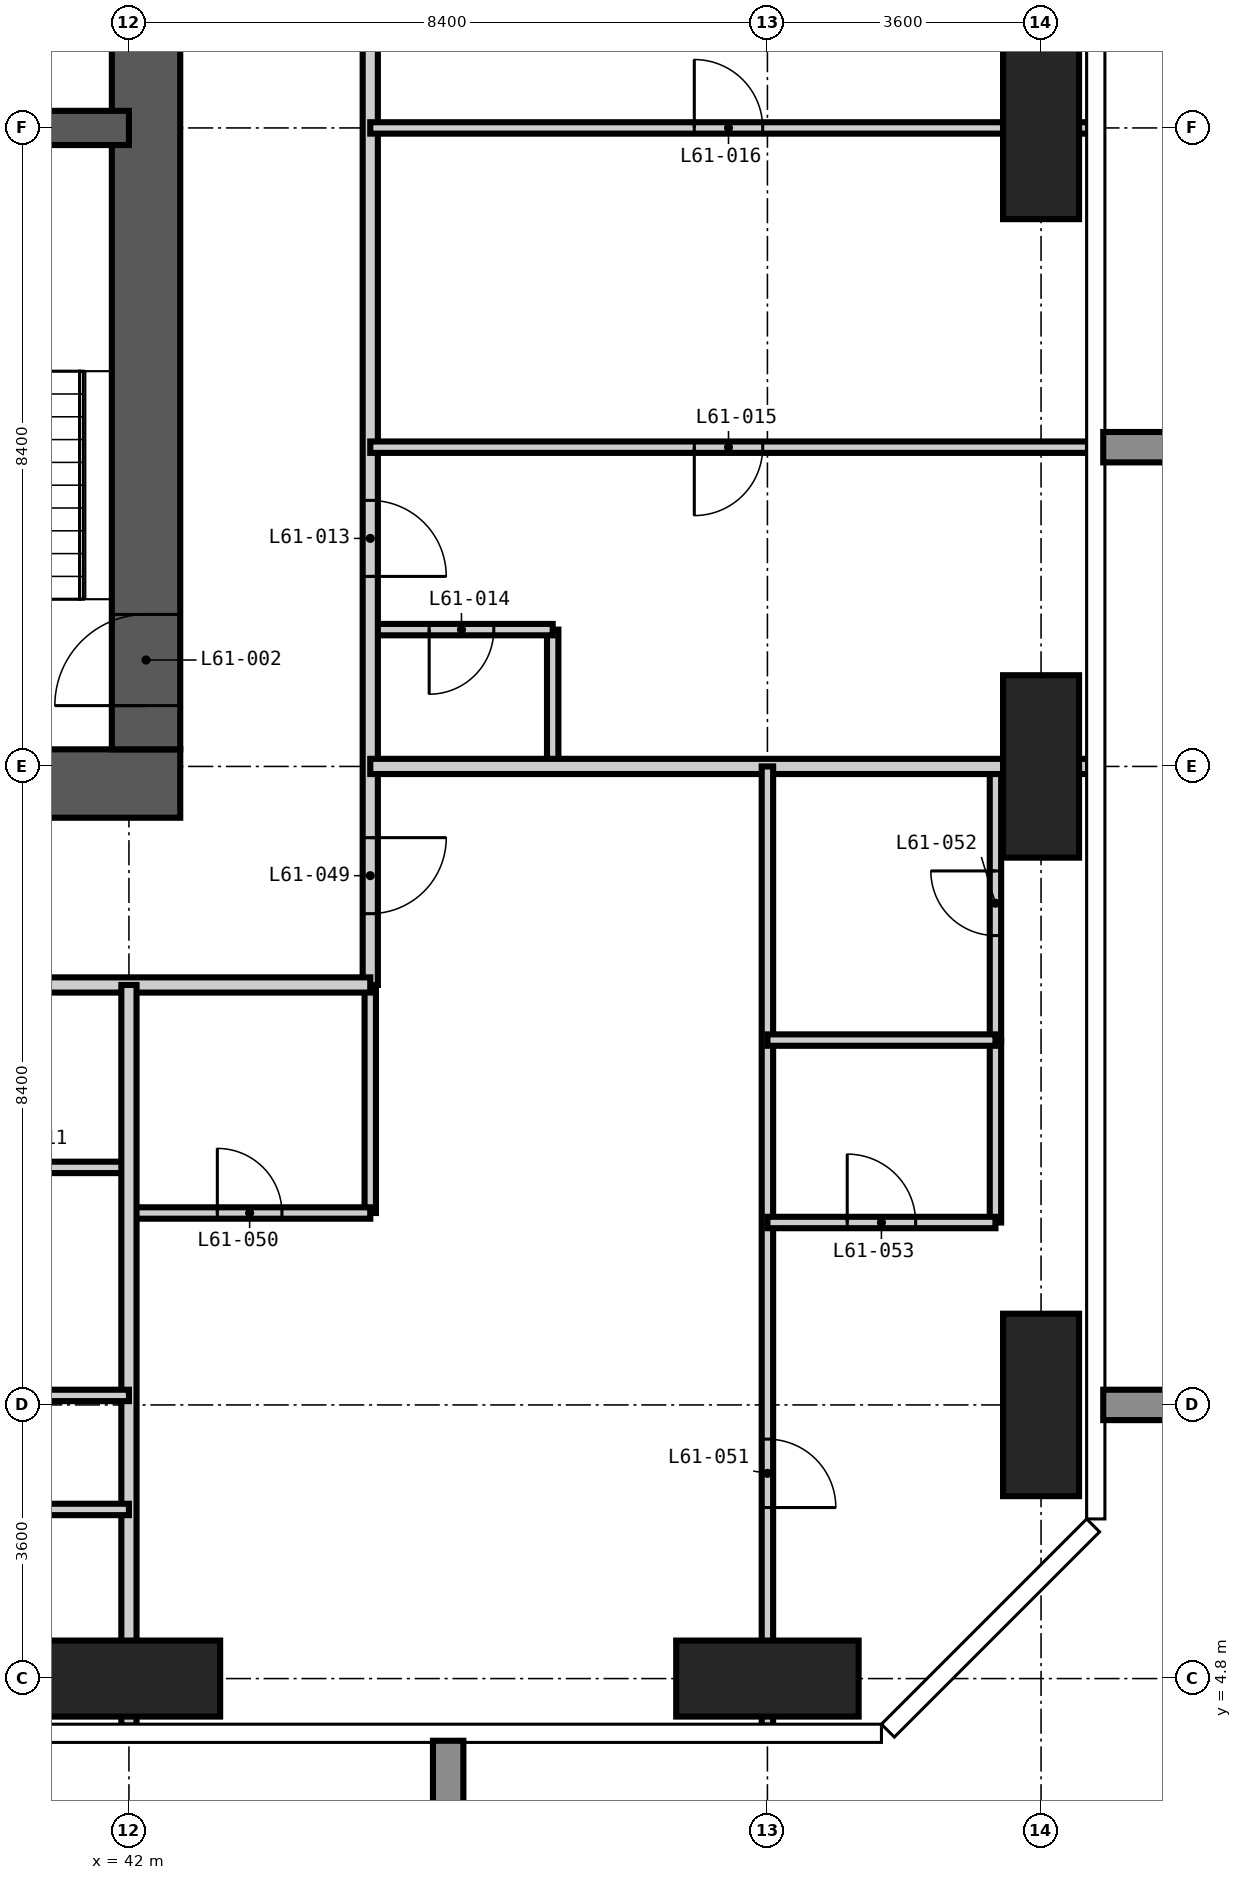
"""IFC4 building model, lengths in metres.
Left out: names, types, materials, properties, quantities, classifications, styles, units other than length and angle.
Written with IfcOpenShell. Run it as: python <this file> out.ifc"""

import sys

from ifc_helpers import new_model, si_unit, direction, frame, frame_2d, origin, origin_2d, place, context, subcontext, project, spatial, rectangle, extrude, element, fill, save


model = new_model("IFC4")
c1 = context("Model", 3, precision=1e-05, world=origin(), true_north=direction((0.0, 1.0)))
c2 = subcontext(c1, "Body", "Model", "MODEL_VIEW")
j1 = project(units=[si_unit("LENGTHUNIT", "METRE"), si_unit("PLANEANGLEUNIT", "RADIAN")], contexts=[c1])
p1 = place(None, origin())
s1 = spatial("IfcSite", under=j1, at=p1, CompositionType="ELEMENT")
p2 = place(p1, origin())
s2 = spatial("IfcBuilding", under=s1, at=p2, CompositionType="ELEMENT")
p3 = place(p2, frame((0.0, 0.0, 237.3)))
s3 = spatial("IfcBuildingStorey", under=s2, at=p3, CompositionType="ELEMENT", Elevation=237.3)
for number, where, z_axis, x_axis in (
    (1, (42.0, 4.8, -0.35), (0.0, 0.0, 1.0), (1.0, 0.0, 0.0)),
    (2, (50.4, 4.8, -0.35), (0.0, 0.0, 1.0), (1.0, 0.0, 0.0)),
):
    element("IfcColumn", number, at=place(p3, frame(where, z_axis=z_axis, x_axis=x_axis)), inside=s3, PredefinedType="COLUMN", context=c2, shape_type="SweptSolid", body=[
        extrude(rectangle(XDim=2.4, YDim=1.0, at=origin_2d()), origin(), (0.0, 0.0, 1.0), 3.9),
    ])
for number, where, z_axis, x_axis in (
    (3, (54.0, 8.4, -0.35), (0.0, 0.0, 1.0), (1.0, 0.0, 0.0)),
    (4, (54.0, 16.8, -0.35), (0.0, 0.0, 1.0), (1.0, 0.0, 0.0)),
    (5, (54.0, 25.2, -0.35), (0.0, 0.0, 1.0), (1.0, 0.0, 0.0)),
):
    element("IfcColumn", number, at=place(p3, frame(where, z_axis=z_axis, x_axis=x_axis)), inside=s3, PredefinedType="COLUMN", context=c2, shape_type="SweptSolid", body=[
        extrude(rectangle(XDim=1.0, YDim=2.4, at=origin_2d()), origin(), (0.0, 0.0, 1.0), 3.9),
    ])
p4 = place(p3, frame((24.525, 16.575, -0.35), z_axis=(0.0, 0.0, 1.0), x_axis=(1.0, 0.0, 0.0)))
e6 = element("IfcWall", 6, at=p4, inside=s3, PredefinedType="SHEAR", context=c2, shape_type="SweptSolid", body=[
    extrude(rectangle(XDim=18.15, YDim=0.9, at=frame_2d((9.075, 0.0))), origin(), (0.0, 0.0, 1.0), 3.9),
])
p5 = place(p4, frame((4.375, 0.0, 0.35)))
e7 = element("IfcOpeningElement", 7, at=p5, cuts=e6, PredefinedType="OPENING", context=c2, shape_type="SweptSolid", body=[
    extrude(rectangle(XDim=1.0, YDim=2.1, at=frame_2d((0.5, 1.05))), frame((0.0, 0.46, 0.0), z_axis=(0.0, -1.0, 0.0), x_axis=(1.0, 0.0, 0.0)), (0.0, 0.0, 1.0), 0.92),
])
p6 = place(p4, frame((10.675, 0.0, 0.35)))
e8 = element("IfcOpeningElement", 8, at=p6, cuts=e6, PredefinedType="OPENING", context=c2, shape_type="SweptSolid", body=[
    extrude(rectangle(XDim=1.0, YDim=2.1, at=frame_2d((0.5, 1.05))), frame((0.0, 0.46, 0.0), z_axis=(0.0, -1.0, 0.0), x_axis=(1.0, 0.0, 0.0)), (0.0, 0.0, 1.0), 0.92),
])
p7 = place(p3, frame((42.225, 17.025, -0.35), z_axis=(0.0, 0.0, 1.0), x_axis=(0.0, 1.0, 0.0)))
e9 = element("IfcWall", 9, at=p7, inside=s3, PredefinedType="SHEAR", context=c2, shape_type="SweptSolid", body=[
    extrude(rectangle(XDim=24.75, YDim=0.9, at=frame_2d((12.375, 0.0))), origin(), (0.0, 0.0, 1.0), 3.9),
])
p8 = place(p7, frame((0.575, 0.0, 0.35)))
e10 = element("IfcOpeningElement", 10, at=p8, cuts=e9, PredefinedType="OPENING", context=c2, shape_type="SweptSolid", body=[
    extrude(rectangle(XDim=1.2, YDim=2.2, at=frame_2d((0.6, 1.1))), frame((0.0, 0.46, 0.0), z_axis=(0.0, -1.0, 0.0), x_axis=(1.0, 0.0, 0.0)), (0.0, 0.0, 1.0), 0.92),
])
p9 = place(p7, frame((11.475, 0.0, 0.35)))
e11 = element("IfcOpeningElement", 11, at=p9, cuts=e9, PredefinedType="OPENING", context=c2, shape_type="SweptSolid", body=[
    extrude(rectangle(XDim=1.8, YDim=2.2, at=frame_2d((0.9, 1.1))), frame((0.0, 0.46, 0.0), z_axis=(0.0, -1.0, 0.0), x_axis=(1.0, 0.0, 0.0)), (0.0, 0.0, 1.0), 0.92),
])
p10 = place(p7, frame((20.275, 0.0, 0.35)))
e12 = element("IfcOpeningElement", 12, at=p10, cuts=e9, PredefinedType="OPENING", context=c2, shape_type="SweptSolid", body=[
    extrude(rectangle(XDim=1.0, YDim=2.1, at=frame_2d((0.5, 1.05))), frame((0.0, 0.46, 0.0), z_axis=(0.0, -1.0, 0.0), x_axis=(1.0, 0.0, 0.0)), (0.0, 0.0, 1.0), 0.92),
])
p11 = place(p3, frame((25.2, 25.2, -0.35), z_axis=(0.0, 0.0, 1.0), x_axis=(1.0, 0.0, 0.0)))
e13 = element("IfcWall", 13, at=p11, inside=s3, PredefinedType="SHEAR", context=c2, shape_type="SweptSolid", body=[
    extrude(rectangle(XDim=16.8, YDim=0.45, at=frame_2d((8.4, 0.0))), origin(), (0.0, 0.0, 1.0), 3.9),
])
p12 = place(p3, frame((45.175, 10.925, 0.0), z_axis=(0.0, 0.0, 1.0), x_axis=(0.0, 1.0, 0.0)))
e14 = element("IfcWall", 14, at=p12, inside=s3, PredefinedType="PARTITIONING", context=c2, shape_type="SweptSolid", body=[
    extrude(rectangle(XDim=3.0, YDim=0.15, at=frame_2d((1.5, 0.0))), origin(), (0.0, 0.0, 1.0), 3.55),
])
p13 = place(p3, frame((47.575, 16.8, 0.0), z_axis=(0.0, 0.0, 1.0), x_axis=(0.0, 1.0, 0.0)))
e15 = element("IfcWall", 15, at=p13, inside=s3, PredefinedType="PARTITIONING", context=c2, shape_type="SweptSolid", body=[
    extrude(rectangle(XDim=1.8, YDim=0.15, at=frame_2d((0.9, 0.0))), origin(), (0.0, 0.0, 1.0), 3.55),
])
p14 = place(p3, frame((53.4, 13.2, 0.0), z_axis=(0.0, 0.0, 1.0), x_axis=(0.0, 1.0, 0.0)))
e16 = element("IfcWall", 16, at=p14, inside=s3, PredefinedType="PARTITIONING", context=c2, shape_type="SweptSolid", body=[
    extrude(rectangle(XDim=3.6, YDim=0.15, at=frame_2d((1.8, 0.0))), origin(), (0.0, 0.0, 1.0), 3.55),
])
p15 = place(p14, frame((1.375, 0.0, 0.0)))
e17 = element("IfcOpeningElement", 17, at=p15, cuts=e16, PredefinedType="OPENING", context=c2, shape_type="SweptSolid", body=[
    extrude(rectangle(XDim=0.85, YDim=2.1, at=frame_2d((0.425, 1.05))), frame((0.0, 0.085, 0.0), z_axis=(0.0, -1.0, 0.0), x_axis=(1.0, 0.0, 0.0)), (0.0, 0.0, 1.0), 0.17),
])
p16 = place(p3, frame((42.0, 10.925, 0.0), z_axis=(0.0, 0.0, 1.0), x_axis=(1.0, 0.0, 0.0)))
e18 = element("IfcWall", 18, at=p16, inside=s3, PredefinedType="PARTITIONING", context=c2, shape_type="SweptSolid", body=[
    extrude(rectangle(XDim=3.175, YDim=0.15, at=frame_2d((1.587, 0.0))), origin(), (0.0, 0.0, 1.0), 3.55),
])
p17 = place(p16, frame((1.163, 0.0, 0.0)))
e19 = element("IfcOpeningElement", 19, at=p17, cuts=e18, PredefinedType="OPENING", context=c2, shape_type="SweptSolid", body=[
    extrude(rectangle(XDim=0.85, YDim=2.1, at=frame_2d((0.425, 1.05))), frame((0.0, 0.085, 0.0), z_axis=(0.0, -1.0, 0.0), x_axis=(1.0, 0.0, 0.0)), (0.0, 0.0, 1.0), 0.17),
])
p18 = place(p3, frame((39.0, 11.525, 0.0), z_axis=(0.0, 0.0, 1.0), x_axis=(1.0, 0.0, 0.0)))
e20 = element("IfcWall", 20, at=p18, inside=s3, PredefinedType="PARTITIONING", context=c2, shape_type="SweptSolid", body=[
    extrude(rectangle(XDim=3.0, YDim=0.15, at=frame_2d((1.5, 0.0))), origin(), (0.0, 0.0, 1.0), 3.55),
])
p19 = place(p18, frame((1.075, 0.0, 0.0)))
e21 = element("IfcOpeningElement", 21, at=p19, cuts=e20, PredefinedType="OPENING", context=c2, shape_type="SweptSolid", body=[
    extrude(rectangle(XDim=0.85, YDim=2.1, at=frame_2d((0.425, 1.05))), frame((0.0, 0.085, 0.0), z_axis=(0.0, -1.0, 0.0), x_axis=(1.0, 0.0, 0.0)), (0.0, 0.0, 1.0), 0.17),
])
p20 = place(p3, frame((45.175, 18.6, 0.0), z_axis=(0.0, 0.0, 1.0), x_axis=(1.0, 0.0, 0.0)))
e22 = element("IfcWall", 22, at=p20, inside=s3, PredefinedType="PARTITIONING", context=c2, shape_type="SweptSolid", body=[
    extrude(rectangle(XDim=2.4, YDim=0.15, at=frame_2d((1.2, 0.0))), origin(), (0.0, 0.0, 1.0), 3.55),
])
p21 = place(p20, frame((0.775, 0.0, 0.0)))
e23 = element("IfcOpeningElement", 23, at=p21, cuts=e22, PredefinedType="OPENING", context=c2, shape_type="SweptSolid", body=[
    extrude(rectangle(XDim=0.85, YDim=2.1, at=frame_2d((0.425, 1.05))), frame((0.0, 0.085, 0.0), z_axis=(0.0, -1.0, 0.0), x_axis=(1.0, 0.0, 0.0)), (0.0, 0.0, 1.0), 0.17),
])
p22 = place(p3, frame((45.175, 29.4, 0.0), z_axis=(0.0, 0.0, 1.0), x_axis=(0.0, -1.0, 0.0)))
e24 = element("IfcWall", 24, at=p22, inside=s3, PredefinedType="PARTITIONING", context=c2, shape_type="SweptSolid", body=[
    extrude(rectangle(XDim=15.475, YDim=0.2, at=frame_2d((7.737, 0.0))), origin(), (0.0, 0.0, 1.0), 3.55),
])
p23 = place(p22, frame((9.1, 0.0, 0.0)))
e25 = element("IfcOpeningElement", 25, at=p23, cuts=e24, PredefinedType="OPENING", context=c2, shape_type="SweptSolid", body=[
    extrude(rectangle(XDim=1.0, YDim=2.2, at=frame_2d((0.5, 1.1))), frame((0.0, 0.11, 0.0), z_axis=(0.0, -1.0, 0.0), x_axis=(1.0, 0.0, 0.0)), (0.0, 0.0, 1.0), 0.22),
])
p24 = place(p22, frame((13.537, 0.0, 0.0)))
e26 = element("IfcOpeningElement", 26, at=p24, cuts=e24, PredefinedType="OPENING", context=c2, shape_type="SweptSolid", body=[
    extrude(rectangle(XDim=1.0, YDim=2.2, at=frame_2d((0.5, 1.1))), frame((0.0, 0.11, 0.0), z_axis=(0.0, -1.0, 0.0), x_axis=(1.0, 0.0, 0.0)), (0.0, 0.0, 1.0), 0.22),
])
p25 = place(p3, frame((45.175, 13.925, 0.0), z_axis=(0.0, 0.0, 1.0), x_axis=(-1.0, 0.0, 0.0)))
e27 = element("IfcWall", 27, at=p25, inside=s3, PredefinedType="PARTITIONING", context=c2, shape_type="SweptSolid", body=[
    extrude(rectangle(XDim=22.85, YDim=0.2, at=frame_2d((11.425, 0.0))), origin(), (0.0, 0.0, 1.0), 3.55),
])
p26 = place(p25, frame((15.275, 0.0, 0.0)))
e28 = element("IfcOpeningElement", 28, at=p26, cuts=e27, PredefinedType="OPENING", context=c2, shape_type="SweptSolid", body=[
    extrude(rectangle(XDim=1.0, YDim=2.2, at=frame_2d((0.5, 1.1))), frame((0.0, 0.11, 0.0), z_axis=(0.0, -1.0, 0.0), x_axis=(1.0, 0.0, 0.0)), (0.0, 0.0, 1.0), 0.22),
])
p27 = place(p25, frame((6.875, 0.0, 0.0)))
e29 = element("IfcOpeningElement", 29, at=p27, cuts=e27, PredefinedType="OPENING", context=c2, shape_type="SweptSolid", body=[
    extrude(rectangle(XDim=1.0, YDim=2.2, at=frame_2d((0.5, 1.1))), frame((0.0, 0.11, 0.0), z_axis=(0.0, -1.0, 0.0), x_axis=(1.0, 0.0, 0.0)), (0.0, 0.0, 1.0), 0.22),
])
p28 = place(p3, frame((42.0, 4.182, 0.0), z_axis=(0.0, 0.0, 1.0), x_axis=(0.0, 1.0, 0.0)))
e30 = element("IfcWall", 30, at=p28, inside=s3, PredefinedType="PARTITIONING", context=c2, shape_type="SweptSolid", body=[
    extrude(rectangle(XDim=9.743, YDim=0.2, at=frame_2d((4.872, 0.0))), origin(), (0.0, 0.0, 1.0), 3.55),
])
p29 = place(p3, frame((45.175, 16.8, 0.0), z_axis=(0.0, 0.0, 1.0), x_axis=(1.0, 0.0, 0.0)))
e31 = element("IfcWall", 31, at=p29, inside=s3, PredefinedType="PARTITIONING", context=c2, shape_type="SweptSolid", body=[
    extrude(rectangle(XDim=9.443, YDim=0.2, at=frame_2d((4.721, 0.0))), origin(), (0.0, 0.0, 1.0), 3.55),
])
p30 = place(p3, frame((50.4, 4.182, 0.0), z_axis=(0.0, 0.0, 1.0), x_axis=(0.0, 1.0, 0.0)))
e32 = element("IfcWall", 32, at=p30, inside=s3, PredefinedType="PARTITIONING", context=c2, shape_type="SweptSolid", body=[
    extrude(rectangle(XDim=12.618, YDim=0.15, at=frame_2d((6.309, 0.0))), origin(), (0.0, 0.0, 1.0), 3.55),
])
p31 = place(p30, frame((2.868, 0.0, 0.0)))
e33 = element("IfcOpeningElement", 33, at=p31, cuts=e32, PredefinedType="OPENING", context=c2, shape_type="SweptSolid", body=[
    extrude(rectangle(XDim=0.9, YDim=2.1, at=frame_2d((0.45, 1.05))), frame((0.0, 0.085, 0.0), z_axis=(0.0, -1.0, 0.0), x_axis=(1.0, 0.0, 0.0)), (0.0, 0.0, 1.0), 0.17),
])
p32 = place(p3, frame((53.4, 10.8, 0.0), z_axis=(0.0, 0.0, 1.0), x_axis=(0.0, 1.0, 0.0)))
e34 = element("IfcWall", 34, at=p32, inside=s3, PredefinedType="PARTITIONING", context=c2, shape_type="SweptSolid", body=[
    extrude(rectangle(XDim=2.4, YDim=0.15, at=frame_2d((1.2, 0.0))), origin(), (0.0, 0.0, 1.0), 3.55),
])
p33 = place(p3, frame((39.0, 7.025, 0.0), z_axis=(0.0, 0.0, 1.0), x_axis=(1.0, 0.0, 0.0)))
e35 = element("IfcWall", 35, at=p33, inside=s3, PredefinedType="PARTITIONING", context=c2, shape_type="SweptSolid", body=[
    extrude(rectangle(XDim=3.0, YDim=0.15, at=frame_2d((1.5, 0.0))), origin(), (0.0, 0.0, 1.0), 3.55),
])
p34 = place(p33, frame((1.05, 0.0, 0.0)))
e36 = element("IfcOpeningElement", 36, at=p34, cuts=e35, PredefinedType="OPENING", context=c2, shape_type="SweptSolid", body=[
    extrude(rectangle(XDim=0.9, YDim=2.1, at=frame_2d((0.45, 1.05))), frame((0.0, 0.085, 0.0), z_axis=(0.0, -1.0, 0.0), x_axis=(1.0, 0.0, 0.0)), (0.0, 0.0, 1.0), 0.17),
])
p35 = place(p3, frame((39.0, 8.525, 0.0), z_axis=(0.0, 0.0, 1.0), x_axis=(1.0, 0.0, 0.0)))
e37 = element("IfcWall", 37, at=p35, inside=s3, PredefinedType="PARTITIONING", context=c2, shape_type="SweptSolid", body=[
    extrude(rectangle(XDim=3.0, YDim=0.15, at=frame_2d((1.5, 0.0))), origin(), (0.0, 0.0, 1.0), 3.55),
])
p36 = place(p3, frame((50.4, 10.8, 0.0), z_axis=(0.0, 0.0, 1.0), x_axis=(1.0, 0.0, 0.0)))
e38 = element("IfcWall", 38, at=p36, inside=s3, PredefinedType="PARTITIONING", context=c2, shape_type="SweptSolid", body=[
    extrude(rectangle(XDim=3.0, YDim=0.15, at=frame_2d((1.5, 0.0))), origin(), (0.0, 0.0, 1.0), 3.55),
])
p37 = place(p36, frame((1.05, 0.0, 0.0)))
e39 = element("IfcOpeningElement", 39, at=p37, cuts=e38, PredefinedType="OPENING", context=c2, shape_type="SweptSolid", body=[
    extrude(rectangle(XDim=0.9, YDim=2.1, at=frame_2d((0.45, 1.05))), frame((0.0, 0.085, 0.0), z_axis=(0.0, -1.0, 0.0), x_axis=(1.0, 0.0, 0.0)), (0.0, 0.0, 1.0), 0.17),
])
p38 = place(p3, frame((50.4, 13.2, 0.0), z_axis=(0.0, 0.0, 1.0), x_axis=(1.0, 0.0, 0.0)))
e40 = element("IfcWall", 40, at=p38, inside=s3, PredefinedType="PARTITIONING", context=c2, shape_type="SweptSolid", body=[
    extrude(rectangle(XDim=3.0, YDim=0.15, at=frame_2d((1.5, 0.0))), origin(), (0.0, 0.0, 1.0), 3.55),
])
p39 = place(p3, frame((45.175, 21.0, 0.0), z_axis=(0.0, 0.0, 1.0), x_axis=(1.0, 0.0, 0.0)))
e41 = element("IfcWall", 41, at=p39, inside=s3, PredefinedType="PARTITIONING", context=c2, shape_type="SweptSolid", body=[
    extrude(rectangle(XDim=9.443, YDim=0.15, at=frame_2d((4.721, 0.0))), origin(), (0.0, 0.0, 1.0), 3.55),
])
p40 = place(p39, frame((4.263, 0.0, 0.0)))
e42 = element("IfcOpeningElement", 42, at=p40, cuts=e41, PredefinedType="OPENING", context=c2, shape_type="SweptSolid", body=[
    extrude(rectangle(XDim=0.9, YDim=2.1, at=frame_2d((0.45, 1.05))), frame((0.0, 0.085, 0.0), z_axis=(0.0, -1.0, 0.0), x_axis=(1.0, 0.0, 0.0)), (0.0, 0.0, 1.0), 0.17),
])
p41 = place(p3, frame((45.175, 25.2, 0.0), z_axis=(0.0, 0.0, 1.0), x_axis=(1.0, 0.0, 0.0)))
e43 = element("IfcWall", 43, at=p41, inside=s3, PredefinedType="PARTITIONING", context=c2, shape_type="SweptSolid", body=[
    extrude(rectangle(XDim=9.443, YDim=0.15, at=frame_2d((4.721, 0.0))), origin(), (0.0, 0.0, 1.0), 3.55),
])
p42 = place(p41, frame((4.263, 0.0, 0.0)))
e44 = element("IfcOpeningElement", 44, at=p42, cuts=e43, PredefinedType="OPENING", context=c2, shape_type="SweptSolid", body=[
    extrude(rectangle(XDim=0.9, YDim=2.1, at=frame_2d((0.45, 1.05))), frame((0.0, 0.085, 0.0), z_axis=(0.0, -1.0, 0.0), x_axis=(1.0, 0.0, 0.0)), (0.0, 0.0, 1.0), 0.17),
])
p43 = place(p8, origin())
e45 = element("IfcDoor", 45, at=p43, inside=s3, OperationType="SINGLE_SWING_LEFT", PredefinedType="DOOR", context=c2, shape_type="SweptSolid", body=[
    extrude(rectangle(XDim=1.2, YDim=2.2, at=frame_2d((0.6, 1.1))), frame((0.0, 0.025, 0.0), z_axis=(0.0, -1.0, 0.0), x_axis=(1.0, 0.0, 0.0)), (0.0, 0.0, 1.0), 0.05),
])
fill(e10, e45)
p44 = place(p23, origin())
e46 = element("IfcDoor", 46, at=p44, inside=s3, OperationType="SINGLE_SWING_RIGHT", PredefinedType="DOOR", context=c2, shape_type="SweptSolid", body=[
    extrude(rectangle(XDim=1.0, YDim=2.2, at=frame_2d((0.5, 1.1))), frame((0.0, 0.025, 0.0), z_axis=(0.0, -1.0, 0.0), x_axis=(1.0, 0.0, 0.0)), (0.0, 0.0, 1.0), 0.05),
])
fill(e25, e46)
p45 = place(p21, frame((0.85, 0.0, 0.0), z_axis=(0.0, 0.0, 1.0), x_axis=(-1.0, 0.0, 0.0)))
e47 = element("IfcDoor", 47, at=p45, inside=s3, OperationType="SINGLE_SWING_RIGHT", PredefinedType="DOOR", context=c2, shape_type="SweptSolid", body=[
    extrude(rectangle(XDim=0.85, YDim=2.1, at=frame_2d((0.425, 1.05))), frame((0.0, 0.025, 0.0), z_axis=(0.0, -1.0, 0.0), x_axis=(1.0, 0.0, 0.0)), (0.0, 0.0, 1.0), 0.05),
])
fill(e23, e47)
p46 = place(p40, frame((0.9, 0.0, 0.0), z_axis=(0.0, 0.0, 1.0), x_axis=(-1.0, 0.0, 0.0)))
e48 = element("IfcDoor", 48, at=p46, inside=s3, OperationType="SINGLE_SWING_RIGHT", PredefinedType="DOOR", context=c2, shape_type="SweptSolid", body=[
    extrude(rectangle(XDim=0.9, YDim=2.1, at=frame_2d((0.45, 1.05))), frame((0.0, 0.025, 0.0), z_axis=(0.0, -1.0, 0.0), x_axis=(1.0, 0.0, 0.0)), (0.0, 0.0, 1.0), 0.05),
])
fill(e42, e48)
p47 = place(p42, origin())
e49 = element("IfcDoor", 49, at=p47, inside=s3, OperationType="SINGLE_SWING_LEFT", PredefinedType="DOOR", context=c2, shape_type="SweptSolid", body=[
    extrude(rectangle(XDim=0.9, YDim=2.1, at=frame_2d((0.45, 1.05))), frame((0.0, 0.025, 0.0), z_axis=(0.0, -1.0, 0.0), x_axis=(1.0, 0.0, 0.0)), (0.0, 0.0, 1.0), 0.05),
])
fill(e44, e49)
p48 = place(p24, origin())
e50 = element("IfcDoor", 50, at=p48, inside=s3, OperationType="SINGLE_SWING_LEFT", PredefinedType="DOOR", context=c2, shape_type="SweptSolid", body=[
    extrude(rectangle(XDim=1.0, YDim=2.2, at=frame_2d((0.5, 1.1))), frame((0.0, 0.025, 0.0), z_axis=(0.0, -1.0, 0.0), x_axis=(1.0, 0.0, 0.0)), (0.0, 0.0, 1.0), 0.05),
])
fill(e26, e50)
p49 = place(p17, origin())
e51 = element("IfcDoor", 51, at=p49, inside=s3, OperationType="SINGLE_SWING_LEFT", PredefinedType="DOOR", context=c2, shape_type="SweptSolid", body=[
    extrude(rectangle(XDim=0.85, YDim=2.1, at=frame_2d((0.425, 1.05))), frame((0.0, 0.025, 0.0), z_axis=(0.0, -1.0, 0.0), x_axis=(1.0, 0.0, 0.0)), (0.0, 0.0, 1.0), 0.05),
])
fill(e19, e51)
p50 = place(p31, frame((0.9, 0.0, 0.0), z_axis=(0.0, 0.0, 1.0), x_axis=(-1.0, 0.0, 0.0)))
e52 = element("IfcDoor", 52, at=p50, inside=s3, OperationType="SINGLE_SWING_RIGHT", PredefinedType="DOOR", context=c2, shape_type="SweptSolid", body=[
    extrude(rectangle(XDim=0.9, YDim=2.1, at=frame_2d((0.45, 1.05))), frame((0.0, 0.025, 0.0), z_axis=(0.0, -1.0, 0.0), x_axis=(1.0, 0.0, 0.0)), (0.0, 0.0, 1.0), 0.05),
])
fill(e33, e52)
p51 = place(p15, origin())
e53 = element("IfcDoor", 53, at=p51, inside=s3, OperationType="SINGLE_SWING_RIGHT", PredefinedType="DOOR", context=c2, shape_type="SweptSolid", body=[
    extrude(rectangle(XDim=0.85, YDim=2.1, at=frame_2d((0.425, 1.05))), frame((0.0, 0.025, 0.0), z_axis=(0.0, -1.0, 0.0), x_axis=(1.0, 0.0, 0.0)), (0.0, 0.0, 1.0), 0.05),
])
fill(e17, e53)
p52 = place(p37, origin())
e54 = element("IfcDoor", 54, at=p52, inside=s3, OperationType="SINGLE_SWING_LEFT", PredefinedType="DOOR", context=c2, shape_type="SweptSolid", body=[
    extrude(rectangle(XDim=0.9, YDim=2.1, at=frame_2d((0.45, 1.05))), frame((0.0, 0.025, 0.0), z_axis=(0.0, -1.0, 0.0), x_axis=(1.0, 0.0, 0.0)), (0.0, 0.0, 1.0), 0.05),
])
fill(e39, e54)
save(model, sys.argv[1])
